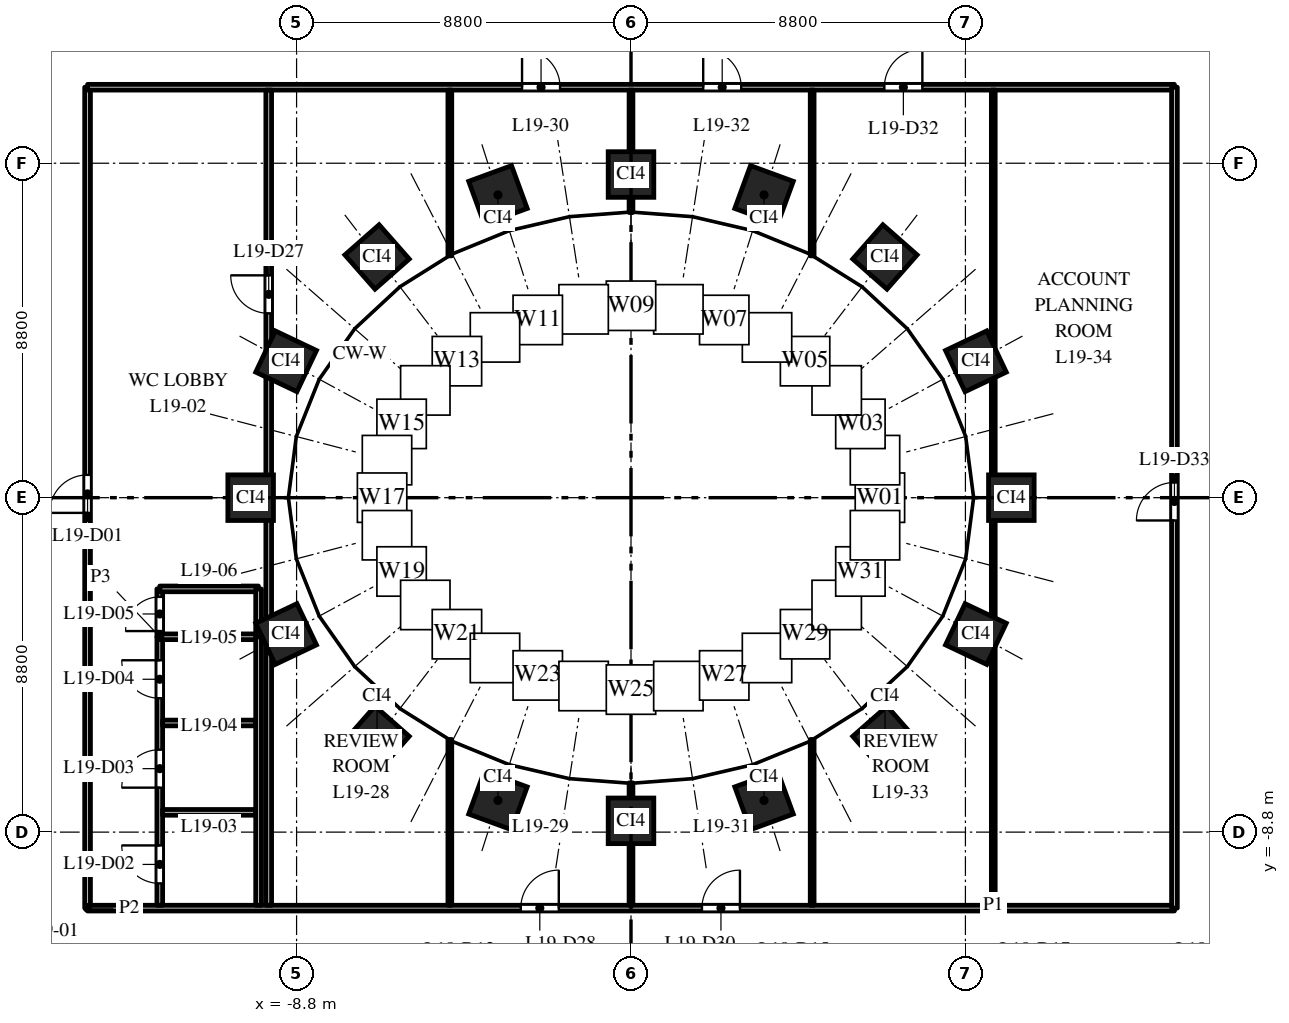
"""IFC4 building model, lengths in metres.
Left out: names, types, materials, properties, quantities, classifications, styles, units other than length and angle.
Written with IfcOpenShell. Run it as: python <this file> out.ifc"""

import sys

from ifc_helpers import new_model, si_unit, direction, frame, frame_2d, origin, origin_2d, place, context, subcontext, project, spatial, rectangle, extrude, element, fill, save


model = new_model("IFC4")
c1 = context("Model", 3, precision=1e-05, world=origin(), true_north=direction((0.0, 1.0)))
c2 = subcontext(c1, "Body", "Model", "MODEL_VIEW")
j1 = project(units=[si_unit("LENGTHUNIT", "METRE"), si_unit("PLANEANGLEUNIT", "RADIAN")], contexts=[c1])
p1 = place(None, origin())
s1 = spatial("IfcSite", under=j1, at=p1, CompositionType="ELEMENT")
p2 = place(p1, origin())
s2 = spatial("IfcBuilding", under=s1, at=p2, CompositionType="ELEMENT")
p3 = place(p2, frame((0.0, 0.0, 88.0)))
s3 = spatial("IfcBuildingStorey", under=s2, at=p3, CompositionType="ELEMENT", Elevation=88.0)
for number, where, z_axis, x_axis in (
    (1, (10.008, 0.0, 0.0), (0.0, 0.0, 1.0), (0.0, 1.0, 0.0)),
    (2, (9.076, 3.588, 0.0), (0.0, 0.0, 1.0), (-0.429, 0.903, 0.0)),
    (3, (6.682, 6.334, 0.0), (0.0, 0.0, 1.0), (-0.751, 0.66, 0.0)),
    (4, (3.501, 7.967, 0.0), (0.0, 0.0, 1.0), (-0.939, 0.344, 0.0)),
    (5, (0.0, 8.503, 0.0), (0.0, 0.0, 1.0), (-1.0, 0.0, 0.0)),
    (6, (-3.501, 7.967, 0.0), (0.0, 0.0, 1.0), (-0.939, -0.344, 0.0)),
    (7, (-6.682, 6.334, 0.0), (0.0, 0.0, 1.0), (-0.751, -0.66, 0.0)),
    (8, (-9.076, 3.588, 0.0), (0.0, 0.0, 1.0), (-0.429, -0.903, 0.0)),
    (9, (-10.008, 0.0, 0.0), (0.0, 0.0, 1.0), (0.0, -1.0, 0.0)),
    (10, (-9.076, -3.588, 0.0), (0.0, 0.0, 1.0), (0.429, -0.903, 0.0)),
    (11, (-6.682, -6.334, 0.0), (0.0, 0.0, 1.0), (0.751, -0.66, 0.0)),
    (12, (-3.501, -7.967, 0.0), (0.0, 0.0, 1.0), (0.939, -0.344, 0.0)),
    (13, (0.0, -8.503, 0.0), (0.0, 0.0, 1.0), (1.0, 0.0, 0.0)),
    (14, (3.501, -7.967, 0.0), (0.0, 0.0, 1.0), (0.939, 0.344, 0.0)),
    (15, (6.682, -6.334, 0.0), (0.0, 0.0, 1.0), (0.751, 0.66, 0.0)),
    (16, (9.076, -3.588, 0.0), (0.0, 0.0, 1.0), (0.429, 0.903, 0.0)),
):
    element("IfcColumn", number, at=place(p3, frame(where, z_axis=z_axis, x_axis=x_axis)), inside=s3, PredefinedType="COLUMN", context=c2, shape_type="SweptSolid", body=[
        extrude(rectangle(XDim=1.2, YDim=1.2, at=origin_2d()), origin(), (0.0, 0.0, 1.0), 4.0),
    ])
p4 = place(p3, frame((-14.3, -10.8, 0.0), z_axis=(0.0, 0.0, 1.0), x_axis=(0.0, 1.0, 0.0)))
e17 = element("IfcWall", 17, at=p4, inside=s3, PredefinedType="PARTITIONING", context=c2, shape_type="SweptSolid", body=[
    extrude(rectangle(XDim=21.6, YDim=0.15, at=frame_2d((10.8, 0.0))), origin(), (0.0, 0.0, 1.0), 2.75),
])
p5 = place(p4, frame((10.4, 0.0, 0.0)))
e18 = element("IfcOpeningElement", 18, at=p5, cuts=e17, PredefinedType="OPENING", context=c2, shape_type="SweptSolid", body=[
    extrude(rectangle(XDim=1.0, YDim=2.1, at=frame_2d((0.5, 1.05))), frame((0.0, 0.085, 0.0), z_axis=(0.0, -1.0, 0.0), x_axis=(1.0, 0.0, 0.0)), (0.0, 0.0, 1.0), 0.17),
])
p6 = place(p3, frame((-14.3, -10.8, 0.0), z_axis=(0.0, 0.0, 1.0), x_axis=(1.0, 0.0, 0.0)))
e19 = element("IfcWall", 19, at=p6, inside=s3, PredefinedType="PARTITIONING", context=c2, shape_type="SweptSolid", body=[
    extrude(rectangle(XDim=28.6, YDim=0.15, at=frame_2d((14.3, 0.0))), origin(), (0.0, 0.0, 1.0), 2.85),
])
p7 = place(p6, frame((11.4, 0.0, 0.0)))
e20 = element("IfcOpeningElement", 20, at=p7, cuts=e19, PredefinedType="OPENING", context=c2, shape_type="SweptSolid", body=[
    extrude(rectangle(XDim=1.0, YDim=2.1, at=frame_2d((0.5, 1.05))), frame((0.0, 0.085, 0.0), z_axis=(0.0, -1.0, 0.0), x_axis=(1.0, 0.0, 0.0)), (0.0, 0.0, 1.0), 0.17),
])
p8 = place(p6, frame((16.167, 0.0, 0.0)))
e21 = element("IfcOpeningElement", 21, at=p8, cuts=e19, PredefinedType="OPENING", context=c2, shape_type="SweptSolid", body=[
    extrude(rectangle(XDim=1.0, YDim=2.1, at=frame_2d((0.5, 1.05))), frame((0.0, 0.085, 0.0), z_axis=(0.0, -1.0, 0.0), x_axis=(1.0, 0.0, 0.0)), (0.0, 0.0, 1.0), 0.17),
])
p9 = place(p3, frame((-14.3, 10.8, 0.0), z_axis=(0.0, 0.0, 1.0), x_axis=(1.0, 0.0, 0.0)))
e22 = element("IfcWall", 22, at=p9, inside=s3, PredefinedType="PARTITIONING", context=c2, shape_type="SweptSolid", body=[
    extrude(rectangle(XDim=28.6, YDim=0.15, at=frame_2d((14.3, 0.0))), origin(), (0.0, 0.0, 1.0), 2.85),
])
p10 = place(p9, frame((11.433, 0.0, 0.0)))
e23 = element("IfcOpeningElement", 23, at=p10, cuts=e22, PredefinedType="OPENING", context=c2, shape_type="SweptSolid", body=[
    extrude(rectangle(XDim=1.0, YDim=2.1, at=frame_2d((0.5, 1.05))), frame((0.0, 0.085, 0.0), z_axis=(0.0, -1.0, 0.0), x_axis=(1.0, 0.0, 0.0)), (0.0, 0.0, 1.0), 0.17),
])
p11 = place(p9, frame((16.2, 0.0, 0.0)))
e24 = element("IfcOpeningElement", 24, at=p11, cuts=e22, PredefinedType="OPENING", context=c2, shape_type="SweptSolid", body=[
    extrude(rectangle(XDim=1.0, YDim=2.1, at=frame_2d((0.5, 1.05))), frame((0.0, 0.085, 0.0), z_axis=(0.0, -1.0, 0.0), x_axis=(1.0, 0.0, 0.0)), (0.0, 0.0, 1.0), 0.17),
])
p12 = place(p9, frame((20.967, 0.0, 0.0)))
e25 = element("IfcOpeningElement", 25, at=p12, cuts=e22, PredefinedType="OPENING", context=c2, shape_type="SweptSolid", body=[
    extrude(rectangle(XDim=1.0, YDim=2.1, at=frame_2d((0.5, 1.05))), frame((0.0, 0.085, 0.0), z_axis=(0.0, -1.0, 0.0), x_axis=(1.0, 0.0, 0.0)), (0.0, 0.0, 1.0), 0.17),
])
p13 = place(p3, frame((-12.4, -10.725, 0.0), z_axis=(0.0, 0.0, 1.0), x_axis=(0.0, 1.0, 0.0)))
e26 = element("IfcWall", 26, at=p13, inside=s3, PredefinedType="PARTITIONING", context=c2, shape_type="SweptSolid", body=[
    extrude(rectangle(XDim=7.065, YDim=0.15, at=frame_2d((3.533, 0.0))), origin(), (0.0, 0.0, 1.0), 2.75),
])
p14 = place(p13, frame((0.575, 0.0, 0.0)))
e27 = element("IfcOpeningElement", 27, at=p14, cuts=e26, PredefinedType="OPENING", context=c2, shape_type="SweptSolid", body=[
    extrude(rectangle(XDim=1.0, YDim=2.1, at=frame_2d((0.5, 1.05))), frame((0.0, 0.085, 0.0), z_axis=(0.0, -1.0, 0.0), x_axis=(1.0, 0.0, 0.0)), (0.0, 0.0, 1.0), 0.17),
])
p15 = place(p13, frame((3.095, 0.0, 0.0)))
e28 = element("IfcOpeningElement", 28, at=p15, cuts=e26, PredefinedType="OPENING", context=c2, shape_type="SweptSolid", body=[
    extrude(rectangle(XDim=1.0, YDim=2.1, at=frame_2d((0.5, 1.05))), frame((0.0, 0.085, 0.0), z_axis=(0.0, -1.0, 0.0), x_axis=(1.0, 0.0, 0.0)), (0.0, 0.0, 1.0), 0.17),
])
p16 = place(p13, frame((5.447, 0.0, 0.0)))
e29 = element("IfcOpeningElement", 29, at=p16, cuts=e26, PredefinedType="OPENING", context=c2, shape_type="SweptSolid", body=[
    extrude(rectangle(XDim=1.0, YDim=2.1, at=frame_2d((0.5, 1.05))), frame((0.0, 0.085, 0.0), z_axis=(0.0, -1.0, 0.0), x_axis=(1.0, 0.0, 0.0)), (0.0, 0.0, 1.0), 0.17),
])
p17 = place(p3, frame((-12.325, -8.28, 0.0), z_axis=(0.0, 0.0, 1.0), x_axis=(1.0, 0.0, 0.0)))
e30 = element("IfcWall", 30, at=p17, inside=s3, PredefinedType="PARTITIONING", context=c2, shape_type="SweptSolid", body=[
    extrude(rectangle(XDim=2.45, YDim=0.15, at=frame_2d((1.225, 0.0))), origin(), (0.0, 0.0, 1.0), 2.75),
])
p18 = place(p3, frame((-12.325, -5.928, 0.0), z_axis=(0.0, 0.0, 1.0), x_axis=(1.0, 0.0, 0.0)))
e31 = element("IfcWall", 31, at=p18, inside=s3, PredefinedType="PARTITIONING", context=c2, shape_type="SweptSolid", body=[
    extrude(rectangle(XDim=2.45, YDim=0.15, at=frame_2d((1.225, 0.0))), origin(), (0.0, 0.0, 1.0), 3.7),
])
p19 = place(p3, frame((-12.4, -3.66, 0.0), z_axis=(0.0, 0.0, 1.0), x_axis=(0.0, 1.0, 0.0)))
e32 = element("IfcWall", 32, at=p19, inside=s3, PredefinedType="PARTITIONING", context=c2, shape_type="SweptSolid", body=[
    extrude(rectangle(XDim=1.26, YDim=0.15, at=frame_2d((0.63, 0.0))), origin(), (0.0, 0.0, 1.0), 3.7),
])
p20 = place(p19, frame((0.15, 0.0, 0.0)))
e33 = element("IfcOpeningElement", 33, at=p20, cuts=e32, PredefinedType="OPENING", context=c2, shape_type="SweptSolid", body=[
    extrude(rectangle(XDim=0.9, YDim=2.1, at=frame_2d((0.45, 1.05))), frame((0.0, 0.085, 0.0), z_axis=(0.0, -1.0, 0.0), x_axis=(1.0, 0.0, 0.0)), (0.0, 0.0, 1.0), 0.17),
])
p21 = place(p3, frame((-12.4, -3.66, 0.0), z_axis=(0.0, 0.0, 1.0), x_axis=(1.0, 0.0, 0.0)))
e34 = element("IfcWall", 34, at=p21, inside=s3, PredefinedType="PARTITIONING", context=c2, shape_type="SweptSolid", body=[
    extrude(rectangle(XDim=2.6, YDim=0.15, at=frame_2d((1.3, 0.0))), origin(), (0.0, 0.0, 1.0), 3.7),
])
p22 = place(p3, frame((-12.4, -2.4, 0.0), z_axis=(0.0, 0.0, 1.0), x_axis=(1.0, 0.0, 0.0)))
e35 = element("IfcWall", 35, at=p22, inside=s3, PredefinedType="PARTITIONING", context=c2, shape_type="SweptSolid", body=[
    extrude(rectangle(XDim=2.596, YDim=0.15, at=frame_2d((1.298, 0.0))), origin(), (0.0, 0.0, 1.0), 3.7),
])
p23 = place(p3, frame((-9.8, -10.725, 0.0), z_axis=(0.0, 0.0, 1.0), x_axis=(0.0, 1.0, 0.0)))
e36 = element("IfcWall", 36, at=p23, inside=s3, PredefinedType="PARTITIONING", context=c2, shape_type="SweptSolid", body=[
    extrude(rectangle(XDim=7.065, YDim=0.15, at=frame_2d((3.533, 0.0))), origin(), (0.0, 0.0, 1.0), 2.75),
])
p24 = place(p3, frame((-9.8, -3.66, 0.0), z_axis=(0.0, 0.0, 1.0), x_axis=(0.0, 1.0, 0.0)))
e37 = element("IfcWall", 37, at=p24, inside=s3, PredefinedType="PARTITIONING", context=c2, shape_type="SweptSolid", body=[
    extrude(rectangle(XDim=1.256, YDim=0.15, at=frame_2d((0.628, 0.0))), origin(), (0.0, 0.0, 1.0), 3.7),
])
p25 = place(p3, frame((-9.533, -10.725, 0.0), z_axis=(0.0, 0.0, 1.0), x_axis=(0.0, 1.0, 0.0)))
e38 = element("IfcWall", 38, at=p25, inside=s3, PredefinedType="PARTITIONING", context=c2, shape_type="SweptSolid", body=[
    extrude(rectangle(XDim=21.45, YDim=0.15, at=frame_2d((10.725, 0.0))), origin(), (0.0, 0.0, 1.0), 2.75),
])
p26 = place(p25, frame((15.575, 0.0, 0.0)))
e39 = element("IfcOpeningElement", 39, at=p26, cuts=e38, PredefinedType="OPENING", context=c2, shape_type="SweptSolid", body=[
    extrude(rectangle(XDim=1.0, YDim=2.1, at=frame_2d((0.5, 1.05))), frame((0.0, 0.085, 0.0), z_axis=(0.0, -1.0, 0.0), x_axis=(1.0, 0.0, 0.0)), (0.0, 0.0, 1.0), 0.17),
])
for number, where, z_axis, x_axis in (
    (40, (-4.767, -10.725, 0.0), (0.0, 0.0, 1.0), (0.0, 1.0, 0.0)),
    (41, (-4.767, 6.363, 0.0), (0.0, 0.0, 1.0), (0.0, 1.0, 0.0)),
):
    element("IfcWall", number, at=place(p3, frame(where, z_axis=z_axis, x_axis=x_axis)), inside=s3, PredefinedType="PARTITIONING", context=c2, shape_type="SweptSolid", body=[
        extrude(rectangle(XDim=4.362, YDim=0.1, at=frame_2d((2.181, 0.0))), origin(), (0.0, 0.0, 1.0), 2.9),
    ])
for number, where, z_axis, x_axis in (
    (42, (0.0, -10.725, 0.0), (0.0, 0.0, 1.0), (0.0, 1.0, 0.0)),
    (43, (0.0, 7.504, 0.0), (0.0, 0.0, 1.0), (0.0, 1.0, 0.0)),
):
    element("IfcWall", number, at=place(p3, frame(where, z_axis=z_axis, x_axis=x_axis)), inside=s3, PredefinedType="PARTITIONING", context=c2, shape_type="SweptSolid", body=[
        extrude(rectangle(XDim=3.221, YDim=0.1, at=frame_2d((1.611, 0.0))), origin(), (0.0, 0.0, 1.0), 3.7),
    ])
for number, where, z_axis, x_axis in (
    (44, (4.767, -10.725, 0.0), (0.0, 0.0, 1.0), (0.0, 1.0, 0.0)),
    (45, (4.767, 6.363, 0.0), (0.0, 0.0, 1.0), (0.0, 1.0, 0.0)),
):
    element("IfcWall", number, at=place(p3, frame(where, z_axis=z_axis, x_axis=x_axis)), inside=s3, PredefinedType="PARTITIONING", context=c2, shape_type="SweptSolid", body=[
        extrude(rectangle(XDim=4.362, YDim=0.1, at=frame_2d((2.181, 0.0))), origin(), (0.0, 0.0, 1.0), 2.85),
    ])
p27 = place(p3, frame((9.533, -10.725, 0.0), z_axis=(0.0, 0.0, 1.0), x_axis=(0.0, 1.0, 0.0)))
e46 = element("IfcWall", 46, at=p27, inside=s3, PredefinedType="PARTITIONING", context=c2, shape_type="SweptSolid", body=[
    extrude(rectangle(XDim=21.45, YDim=0.1, at=frame_2d((10.725, 0.0))), origin(), (0.0, 0.0, 1.0), 2.75),
])
p28 = place(p3, frame((14.3, -10.8, 0.0), z_axis=(0.0, 0.0, 1.0), x_axis=(0.0, 1.0, 0.0)))
e47 = element("IfcWall", 47, at=p28, inside=s3, PredefinedType="PARTITIONING", context=c2, shape_type="SweptSolid", body=[
    extrude(rectangle(XDim=21.6, YDim=0.15, at=frame_2d((10.8, 0.0))), origin(), (0.0, 0.0, 1.0), 2.75),
])
p29 = place(p28, frame((10.2, 0.0, 0.0)))
e48 = element("IfcOpeningElement", 48, at=p29, cuts=e47, PredefinedType="OPENING", context=c2, shape_type="SweptSolid", body=[
    extrude(rectangle(XDim=1.0, YDim=2.1, at=frame_2d((0.5, 1.05))), frame((0.0, 0.085, 0.0), z_axis=(0.0, -1.0, 0.0), x_axis=(1.0, 0.0, 0.0)), (0.0, 0.0, 1.0), 0.17),
])
p30 = place(p5, origin())
e49 = element("IfcDoor", 49, at=p30, inside=s3, OperationType="SINGLE_SWING_LEFT", PredefinedType="DOOR", context=c2, shape_type="SweptSolid", body=[
    extrude(rectangle(XDim=1.0, YDim=2.1, at=frame_2d((0.5, 1.05))), frame((0.0, 0.025, 0.0), z_axis=(0.0, -1.0, 0.0), x_axis=(1.0, 0.0, 0.0)), (0.0, 0.0, 1.0), 0.05),
])
fill(e18, e49)
p31 = place(p14, origin())
e50 = element("IfcDoor", 50, at=p31, inside=s3, OperationType="SINGLE_SWING_RIGHT", PredefinedType="DOOR", context=c2, shape_type="SweptSolid", body=[
    extrude(rectangle(XDim=1.0, YDim=2.1, at=frame_2d((0.5, 1.05))), frame((0.0, 0.025, 0.0), z_axis=(0.0, -1.0, 0.0), x_axis=(1.0, 0.0, 0.0)), (0.0, 0.0, 1.0), 0.05),
])
fill(e27, e50)
p32 = place(p15, origin())
e51 = element("IfcDoor", 51, at=p32, inside=s3, OperationType="SINGLE_SWING_LEFT", PredefinedType="DOOR", context=c2, shape_type="SweptSolid", body=[
    extrude(rectangle(XDim=1.0, YDim=2.1, at=frame_2d((0.5, 1.05))), frame((0.0, 0.025, 0.0), z_axis=(0.0, -1.0, 0.0), x_axis=(1.0, 0.0, 0.0)), (0.0, 0.0, 1.0), 0.05),
])
fill(e28, e51)
p33 = place(p16, origin())
e52 = element("IfcDoor", 52, at=p33, inside=s3, OperationType="SINGLE_SWING_RIGHT", PredefinedType="DOOR", context=c2, shape_type="SweptSolid", body=[
    extrude(rectangle(XDim=1.0, YDim=2.1, at=frame_2d((0.5, 1.05))), frame((0.0, 0.025, 0.0), z_axis=(0.0, -1.0, 0.0), x_axis=(1.0, 0.0, 0.0)), (0.0, 0.0, 1.0), 0.05),
])
fill(e29, e52)
p34 = place(p20, origin())
e53 = element("IfcDoor", 53, at=p34, inside=s3, OperationType="SINGLE_SWING_LEFT", PredefinedType="DOOR", context=c2, shape_type="SweptSolid", body=[
    extrude(rectangle(XDim=0.9, YDim=2.1, at=frame_2d((0.45, 1.05))), frame((0.0, 0.025, 0.0), z_axis=(0.0, -1.0, 0.0), x_axis=(1.0, 0.0, 0.0)), (0.0, 0.0, 1.0), 0.05),
])
fill(e33, e53)
p35 = place(p26, origin())
e54 = element("IfcDoor", 54, at=p35, inside=s3, OperationType="SINGLE_SWING_RIGHT", PredefinedType="DOOR", context=c2, shape_type="SweptSolid", body=[
    extrude(rectangle(XDim=1.0, YDim=2.1, at=frame_2d((0.5, 1.05))), frame((0.0, 0.025, 0.0), z_axis=(0.0, -1.0, 0.0), x_axis=(1.0, 0.0, 0.0)), (0.0, 0.0, 1.0), 0.05),
])
fill(e39, e54)
p36 = place(p7, origin())
e55 = element("IfcDoor", 55, at=p36, inside=s3, OperationType="SINGLE_SWING_RIGHT", PredefinedType="DOOR", context=c2, shape_type="SweptSolid", body=[
    extrude(rectangle(XDim=1.0, YDim=2.1, at=frame_2d((0.5, 1.05))), frame((0.0, 0.025, 0.0), z_axis=(0.0, -1.0, 0.0), x_axis=(1.0, 0.0, 0.0)), (0.0, 0.0, 1.0), 0.05),
])
fill(e20, e55)
p37 = place(p10, origin())
e56 = element("IfcDoor", 56, at=p37, inside=s3, OperationType="SINGLE_SWING_LEFT", PredefinedType="DOOR", context=c2, shape_type="SweptSolid", body=[
    extrude(rectangle(XDim=1.0, YDim=2.1, at=frame_2d((0.5, 1.05))), frame((0.0, 0.025, 0.0), z_axis=(0.0, -1.0, 0.0), x_axis=(1.0, 0.0, 0.0)), (0.0, 0.0, 1.0), 0.05),
])
fill(e23, e56)
p38 = place(p8, origin())
e57 = element("IfcDoor", 57, at=p38, inside=s3, OperationType="SINGLE_SWING_RIGHT", PredefinedType="DOOR", context=c2, shape_type="SweptSolid", body=[
    extrude(rectangle(XDim=1.0, YDim=2.1, at=frame_2d((0.5, 1.05))), frame((0.0, 0.025, 0.0), z_axis=(0.0, -1.0, 0.0), x_axis=(1.0, 0.0, 0.0)), (0.0, 0.0, 1.0), 0.05),
])
fill(e21, e57)
p39 = place(p11, origin())
e58 = element("IfcDoor", 58, at=p39, inside=s3, OperationType="SINGLE_SWING_LEFT", PredefinedType="DOOR", context=c2, shape_type="SweptSolid", body=[
    extrude(rectangle(XDim=1.0, YDim=2.1, at=frame_2d((0.5, 1.05))), frame((0.0, 0.025, 0.0), z_axis=(0.0, -1.0, 0.0), x_axis=(1.0, 0.0, 0.0)), (0.0, 0.0, 1.0), 0.05),
])
fill(e24, e58)
p40 = place(p12, origin())
e59 = element("IfcDoor", 59, at=p40, inside=s3, OperationType="SINGLE_SWING_RIGHT", PredefinedType="DOOR", context=c2, shape_type="SweptSolid", body=[
    extrude(rectangle(XDim=1.0, YDim=2.1, at=frame_2d((0.5, 1.05))), frame((0.0, 0.025, 0.0), z_axis=(0.0, -1.0, 0.0), x_axis=(1.0, 0.0, 0.0)), (0.0, 0.0, 1.0), 0.05),
])
fill(e25, e59)
p41 = place(p29, origin())
e60 = element("IfcDoor", 60, at=p41, inside=s3, OperationType="SINGLE_SWING_LEFT", PredefinedType="DOOR", context=c2, shape_type="SweptSolid", body=[
    extrude(rectangle(XDim=1.0, YDim=2.1, at=frame_2d((0.5, 1.05))), frame((0.0, 0.025, 0.0), z_axis=(0.0, -1.0, 0.0), x_axis=(1.0, 0.0, 0.0)), (0.0, 0.0, 1.0), 0.05),
])
fill(e48, e60)
save(model, sys.argv[1])
